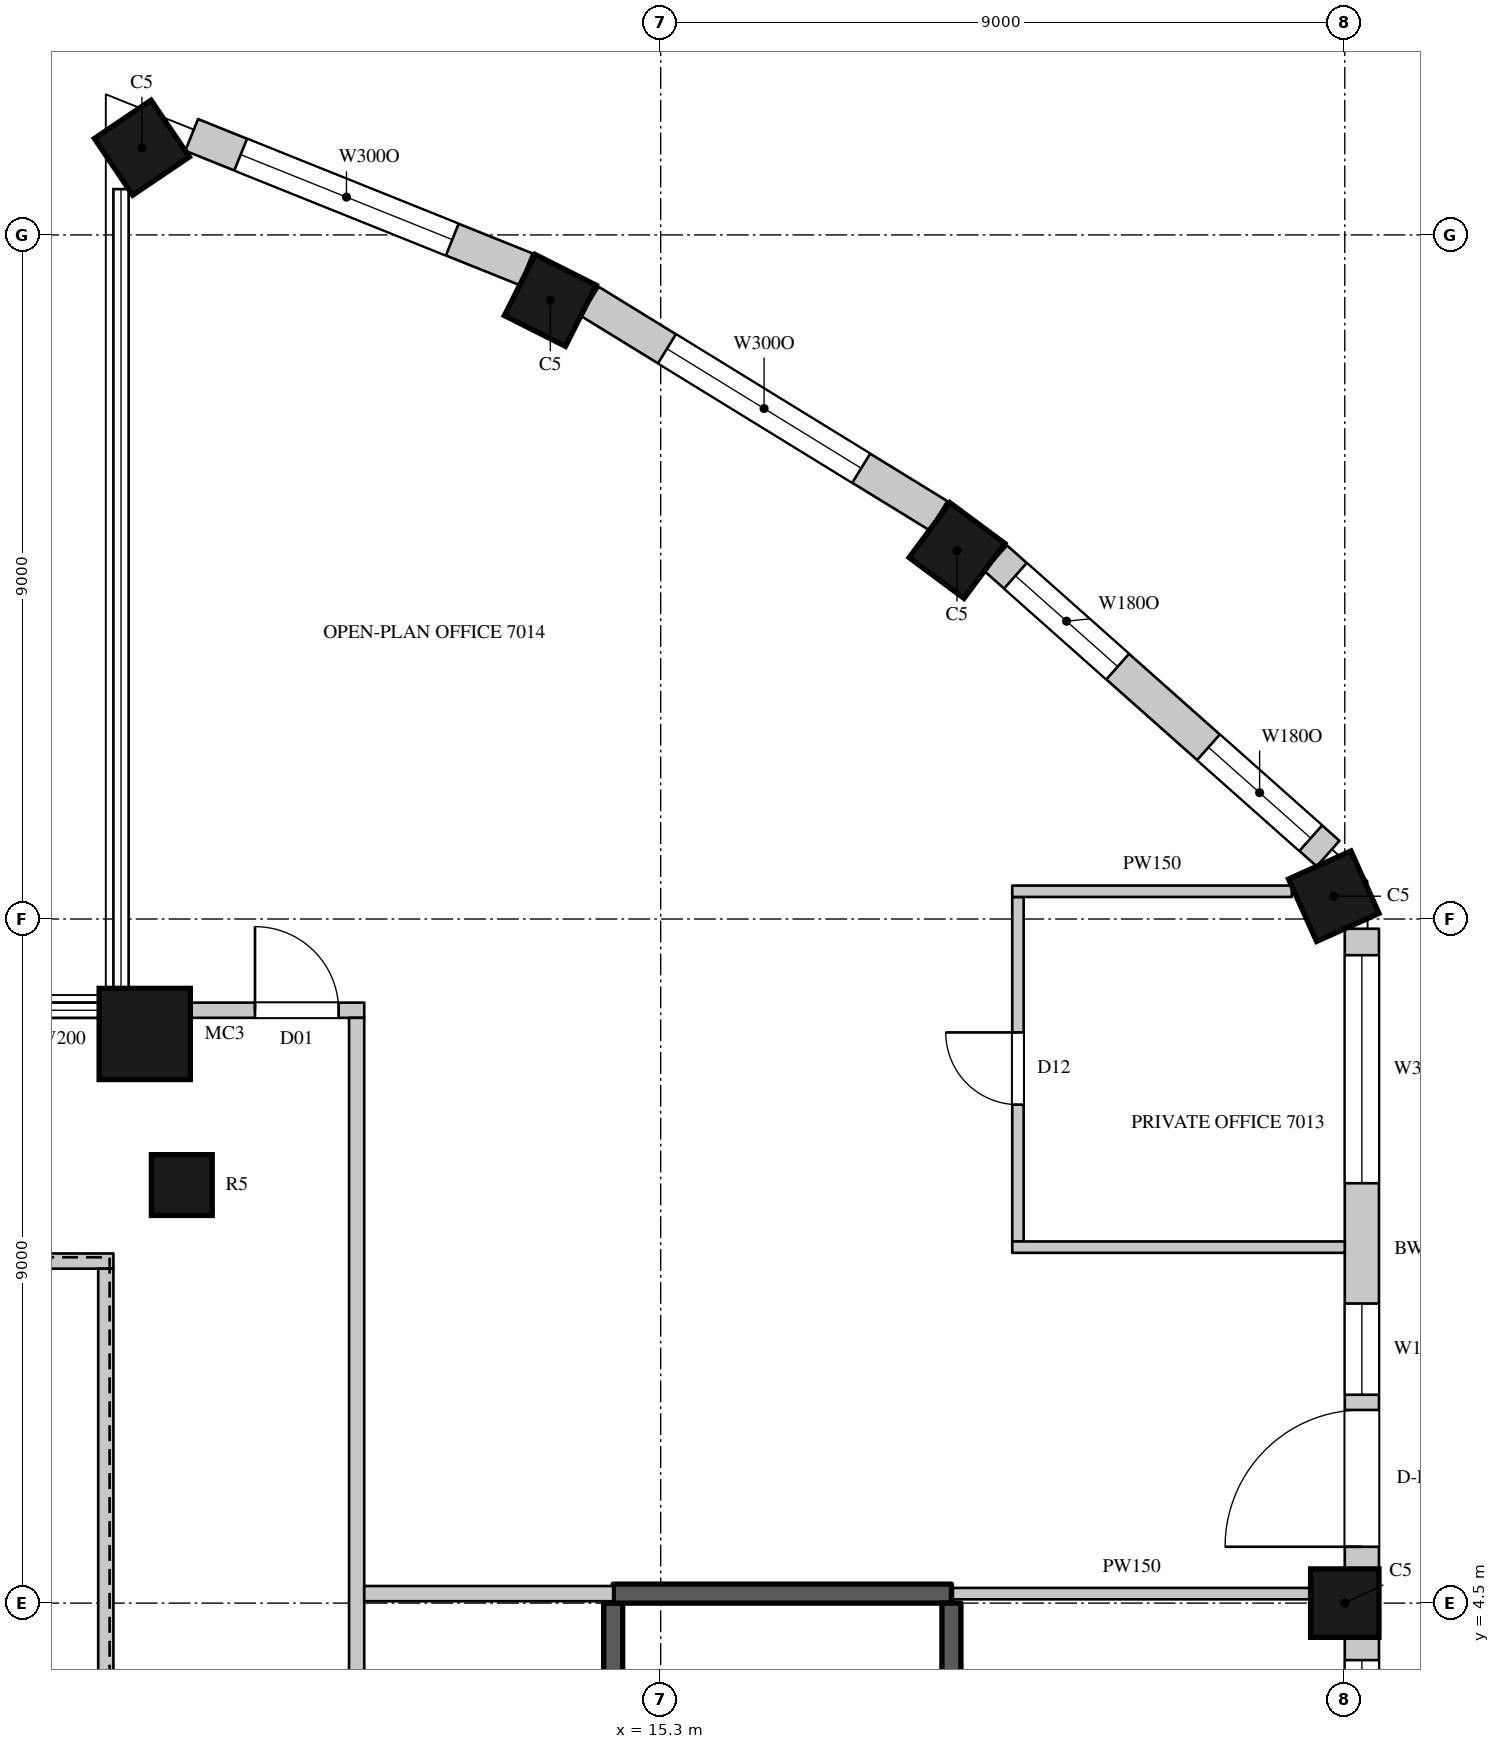
"""IFC4 building model, lengths in metres.
Left out: names, types, materials, properties, quantities, classifications, styles, units other than length and angle.
Written with IfcOpenShell. Run it as: python <this file> out.ifc"""

import sys

from ifc_helpers import new_model, si_unit, direction, frame, frame_2d, origin, origin_2d, place, context, subcontext, project, spatial, rectangle, circle, extrude, element, fill, save


model = new_model("IFC4")
c1 = context("Model", 3, precision=1e-05, world=origin(), true_north=direction((0.0, 1.0)))
c2 = subcontext(c1, "Body", "Model", "MODEL_VIEW")
j1 = project(units=[si_unit("LENGTHUNIT", "METRE"), si_unit("PLANEANGLEUNIT", "RADIAN")], contexts=[c1])
p1 = place(None, origin())
s1 = spatial("IfcSite", under=j1, at=p1, CompositionType="ELEMENT")
p2 = place(p1, origin())
s2 = spatial("IfcBuilding", under=s1, at=p2, CompositionType="ELEMENT")
p3 = place(p2, frame((0.0, 0.0, 309.0)))
s3 = spatial("IfcBuildingStorey", under=s2, at=p3, CompositionType="ELEMENT", Elevation=309.0)
p4 = place(p3, frame((8.475, 23.647, 0.0), z_axis=(0.0, 0.0, 1.0), x_axis=(-0.828469606019, -0.560034027451, 0.0)))
e1 = element("IfcColumn", 1, at=p4, inside=s3, PredefinedType="COLUMN", context=c2, shape_type="SweptSolid", body=[
    extrude(rectangle(XDim=0.9, YDim=0.9, at=origin_2d()), origin(), (0.0, 0.0, 1.0), 4.1),
])
p5 = place(p3, frame((8.512, 11.988, 0.0), z_axis=(0.0, 0.0, 1.0), x_axis=(1.0, 0.0, 0.0)))
e2 = element("IfcColumn", 2, at=p5, inside=s3, PredefinedType="COLUMN", context=c2, shape_type="SweptSolid", body=[
    extrude(circle(Radius=0.6, at=origin_2d()), origin(), (0.0, 0.0, 1.0), 4.1),
])
for number, where, z_axis, x_axis in (
    (3, (24.3, 4.5, 0.0), (0.0, 0.0, 1.0), (0.0, 1.0, 0.0)),
    (4, (24.155, 13.8, 0.0), (0.0, 0.0, 1.0), (-0.41, 0.912, 0.0)),
    (5, (19.198, 18.348, 0.0), (0.0, 0.0, 1.0), (-0.803, 0.596, 0.0)),
    (6, (13.848, 21.638, 0.0), (0.0, 0.0, 1.0), (-0.893, 0.45, 0.0)),
):
    element("IfcColumn", number, at=place(p3, frame(where, z_axis=z_axis, x_axis=x_axis)), inside=s3, PredefinedType="COLUMN", context=c2, shape_type="SweptSolid", body=[
        extrude(rectangle(XDim=0.9, YDim=0.9, at=origin_2d()), origin(), (0.0, 0.0, 1.0), 4.1),
    ])
p6 = place(p3, frame((9.0, 10.0, 0.0), z_axis=(0.0, 0.0, 1.0), x_axis=(1.0, 0.0, 0.0)))
e7 = element("IfcColumn", 7, at=p6, inside=s3, PredefinedType="COLUMN", context=c2, shape_type="SweptSolid", body=[
    extrude(circle(Radius=0.4, at=origin_2d()), origin(), (0.0, 0.0, 1.0), 4.1),
])
p7 = place(p3, frame((24.525, -4.05, 0.0), z_axis=(0.0, 0.0, 1.0), x_axis=(0.0, 1.0, 0.0)))
e8 = element("IfcWall", 8, at=p7, inside=s3, PredefinedType="SOLIDWALL", context=c2, shape_type="SweptSolid", body=[
    extrude(rectangle(XDim=8.1, YDim=0.45, at=frame_2d((4.05, 0.0))), origin(), (0.0, 0.0, 1.0), 3.8),
])
p8 = place(p7, frame((0.3, 0.0, 1.05)))
e9 = element("IfcOpeningElement", 9, at=p8, cuts=e8, PredefinedType="OPENING", context=c2, shape_type="SweptSolid", body=[
    extrude(rectangle(XDim=3.0, YDim=2.4, at=frame_2d((1.5, 1.2))), frame((0.0, 0.235, 0.0), z_axis=(0.0, -1.0, 0.0), x_axis=(1.0, 0.0, 0.0)), (0.0, 0.0, 1.0), 0.47),
])
p9 = place(p7, frame((4.8, 0.0, 1.05)))
e10 = element("IfcOpeningElement", 10, at=p9, cuts=e8, PredefinedType="OPENING", context=c2, shape_type="SweptSolid", body=[
    extrude(rectangle(XDim=3.0, YDim=2.4, at=frame_2d((1.5, 1.2))), frame((0.0, 0.235, 0.0), z_axis=(0.0, -1.0, 0.0), x_axis=(1.0, 0.0, 0.0)), (0.0, 0.0, 1.0), 0.47),
])
p10 = place(p3, frame((24.525, 4.95, 0.0), z_axis=(0.0, 0.0, 1.0), x_axis=(0.0, 1.0, 0.0)))
e11 = element("IfcWall", 11, at=p10, inside=s3, PredefinedType="SOLIDWALL", context=c2, shape_type="SweptSolid", body=[
    extrude(rectangle(XDim=8.422, YDim=0.45, at=frame_2d((4.211, 0.0))), origin(), (0.0, 0.0, 1.0), 3.8),
])
p11 = place(p10, frame((0.291, 0.0, 0.0)))
e12 = element("IfcOpeningElement", 12, at=p11, cuts=e11, PredefinedType="OPENING", context=c2, shape_type="SweptSolid", body=[
    extrude(rectangle(XDim=1.8, YDim=2.4, at=frame_2d((0.9, 1.2))), frame((0.0, 0.235, 0.0), z_axis=(0.0, -1.0, 0.0), x_axis=(1.0, 0.0, 0.0)), (0.0, 0.0, 1.0), 0.47),
])
p12 = place(p10, frame((2.291, 0.0, 1.05)))
e13 = element("IfcOpeningElement", 13, at=p12, cuts=e11, PredefinedType="OPENING", context=c2, shape_type="SweptSolid", body=[
    extrude(rectangle(XDim=1.2, YDim=2.4, at=frame_2d((0.6, 1.2))), frame((0.0, 0.235, 0.0), z_axis=(0.0, -1.0, 0.0), x_axis=(1.0, 0.0, 0.0)), (0.0, 0.0, 1.0), 0.47),
])
p13 = place(p10, frame((5.074, 0.0, 1.05)))
e14 = element("IfcOpeningElement", 14, at=p13, cuts=e11, PredefinedType="OPENING", context=c2, shape_type="SweptSolid", body=[
    extrude(rectangle(XDim=3.0, YDim=2.4, at=frame_2d((1.5, 1.2))), frame((0.0, 0.235, 0.0), z_axis=(0.0, -1.0, 0.0), x_axis=(1.0, 0.0, 0.0)), (0.0, 0.0, 1.0), 0.47),
])
p14 = place(p3, frame((24.081, 14.361, 0.0), z_axis=(0.0, 0.0, 1.0), x_axis=(-0.747570482973, 0.664182484704, 0.0)))
e15 = element("IfcWall", 15, at=p14, inside=s3, PredefinedType="SOLIDWALL", context=c2, shape_type="SweptSolid", body=[
    extrude(rectangle(XDim=5.85, YDim=0.45, at=frame_2d((2.925, 0.0))), origin(), (0.0, 0.0, 1.0), 3.8),
])
p15 = place(p14, frame((0.305, 0.0, 1.05)))
e16 = element("IfcOpeningElement", 16, at=p15, cuts=e15, PredefinedType="OPENING", context=c2, shape_type="SweptSolid", body=[
    extrude(rectangle(XDim=1.8, YDim=2.4, at=frame_2d((0.9, 1.2))), frame((0.0, 0.235, 0.0), z_axis=(0.0, -1.0, 0.0), x_axis=(1.0, 0.0, 0.0)), (0.0, 0.0, 1.0), 0.47),
])
p16 = place(p14, frame((3.703, 0.0, 1.05)))
e17 = element("IfcOpeningElement", 17, at=p16, cuts=e15, PredefinedType="OPENING", context=c2, shape_type="SweptSolid", body=[
    extrude(rectangle(XDim=1.8, YDim=2.4, at=frame_2d((0.9, 1.2))), frame((0.0, 0.235, 0.0), z_axis=(0.0, -1.0, 0.0), x_axis=(1.0, 0.0, 0.0)), (0.0, 0.0, 1.0), 0.47),
])
p17 = place(p3, frame((18.953, 18.806, 0.0), z_axis=(0.0, 0.0, 1.0), x_axis=(-0.851860664503, 0.523768468193, 0.0)))
e18 = element("IfcWall", 18, at=p17, inside=s3, PredefinedType="SOLIDWALL", context=c2, shape_type="SweptSolid", body=[
    extrude(rectangle(XDim=5.384, YDim=0.45, at=frame_2d((2.692, 0.0))), origin(), (0.0, 0.0, 1.0), 3.8),
])
p18 = place(p17, frame((1.192, 0.0, 1.05)))
e19 = element("IfcOpeningElement", 19, at=p18, cuts=e18, PredefinedType="OPENING", context=c2, shape_type="SweptSolid", body=[
    extrude(rectangle(XDim=3.0, YDim=2.4, at=frame_2d((1.5, 1.2))), frame((0.0, 0.235, 0.0), z_axis=(0.0, -1.0, 0.0), x_axis=(1.0, 0.0, 0.0)), (0.0, 0.0, 1.0), 0.47),
])
p19 = place(p3, frame((13.529, 22.048, 0.0), z_axis=(0.0, 0.0, 1.0), x_axis=(-0.927957332619, 0.372686448424, 0.0)))
e20 = element("IfcWall", 20, at=p19, inside=s3, PredefinedType="SOLIDWALL", context=c2, shape_type="SweptSolid", body=[
    extrude(rectangle(XDim=4.741, YDim=0.45, at=frame_2d((2.371, 0.0))), origin(), (0.0, 0.0, 1.0), 3.8),
])
p20 = place(p19, frame((1.047, 0.0, 1.05)))
e21 = element("IfcOpeningElement", 21, at=p20, cuts=e20, PredefinedType="OPENING", context=c2, shape_type="SweptSolid", body=[
    extrude(rectangle(XDim=3.0, YDim=2.4, at=frame_2d((1.5, 1.2))), frame((0.0, 0.235, 0.0), z_axis=(0.0, -1.0, 0.0), x_axis=(1.0, 0.0, 0.0)), (0.0, 0.0, 1.0), 0.47),
])
p21 = place(p3, frame((4.52, 9.0, 0.0), z_axis=(0.0, 0.0, 1.0), x_axis=(1.0, 0.0, 0.0)))
e22 = element("IfcWall", 22, at=p21, inside=s3, PredefinedType="PARTITIONING", context=c2, shape_type="SweptSolid", body=[
    extrude(rectangle(XDim=3.58, YDim=0.2, at=frame_2d((1.79, 0.0))), origin(), (0.0, 0.0, 1.0), 3.8),
])
p22 = place(p3, frame((6.75, 12.3, 0.0), z_axis=(0.0, 0.0, 1.0), x_axis=(1.0, 0.0, 0.0)))
e23 = element("IfcWall", 23, at=p22, inside=s3, PredefinedType="PARTITIONING", context=c2, shape_type="SweptSolid", body=[
    extrude(rectangle(XDim=1.212, YDim=0.2, at=frame_2d((0.606, 0.0))), origin(), (0.0, 0.0, 1.0), 3.8),
])
p23 = place(p3, frame((8.0, -8.9, 0.0), z_axis=(0.0, 0.0, 1.0), x_axis=(0.0, 1.0, 0.0)))
e24 = element("IfcWall", 24, at=p23, inside=s3, PredefinedType="PARTITIONING", context=c2, shape_type="SweptSolid", body=[
    extrude(rectangle(XDim=17.8, YDim=0.2, at=frame_2d((8.9, 0.0))), origin(), (0.0, 0.0, 1.0), 3.8),
])
p24 = place(p3, frame((9.062, 12.3, 0.0), z_axis=(0.0, 0.0, 1.0), x_axis=(1.0, 0.0, 0.0)))
e25 = element("IfcWall", 25, at=p24, inside=s3, PredefinedType="PARTITIONING", context=c2, shape_type="SweptSolid", body=[
    extrude(rectangle(XDim=2.338, YDim=0.2, at=frame_2d((1.169, 0.0))), origin(), (0.0, 0.0, 1.0), 3.8),
])
p25 = place(p24, frame((0.9, 0.0, 0.0)))
e26 = element("IfcOpeningElement", 26, at=p25, cuts=e25, PredefinedType="OPENING", context=c2, shape_type="SweptSolid", body=[
    extrude(rectangle(XDim=1.1, YDim=2.4, at=frame_2d((0.55, 1.2))), frame((0.0, 0.11, 0.0), z_axis=(0.0, -1.0, 0.0), x_axis=(1.0, 0.0, 0.0)), (0.0, 0.0, 1.0), 0.22),
])
p26 = place(p3, frame((11.3, -12.3, 0.0), z_axis=(0.0, 0.0, 1.0), x_axis=(0.0, 1.0, 0.0)))
e27 = element("IfcWall", 27, at=p26, inside=s3, PredefinedType="PARTITIONING", context=c2, shape_type="SweptSolid", body=[
    extrude(rectangle(XDim=24.5, YDim=0.2, at=frame_2d((12.25, 0.0))), origin(), (0.0, 0.0, 1.0), 3.8),
])
p27 = place(p26, frame((10.15, 0.0, 0.0)))
e28 = element("IfcOpeningElement", 28, at=p27, cuts=e27, PredefinedType="OPENING", context=c2, shape_type="SweptSolid", body=[
    extrude(rectangle(XDim=1.5, YDim=2.4, at=frame_2d((0.75, 1.2))), frame((0.0, 0.11, 0.0), z_axis=(0.0, -1.0, 0.0), x_axis=(1.0, 0.0, 0.0)), (0.0, 0.0, 1.0), 0.22),
])
p28 = place(p3, frame((11.4, 4.625, 0.0), z_axis=(0.0, 0.0, 1.0), x_axis=(1.0, 0.0, 0.0)))
e29 = element("IfcWall", 29, at=p28, inside=s3, PredefinedType="PARTITIONING", context=c2, shape_type="SweptSolid", body=[
    extrude(rectangle(XDim=3.275, YDim=0.2, at=frame_2d((1.638, 0.0))), origin(), (0.0, 0.0, 1.0), 3.8),
])
p29 = place(p3, frame((19.145, 4.625, 0.0), z_axis=(0.0, 0.0, 1.0), x_axis=(1.0, 0.0, 0.0)))
e30 = element("IfcWall", 30, at=p29, inside=s3, PredefinedType="PARTITIONING", context=c2, shape_type="SweptSolid", body=[
    extrude(rectangle(XDim=4.705, YDim=0.15, at=frame_2d((2.353, 0.0))), origin(), (0.0, 0.0, 1.0), 3.8),
])
p30 = place(p3, frame((20.0, 9.258, 0.0), z_axis=(0.0, 0.0, 1.0), x_axis=(0.0, 1.0, 0.0)))
e31 = element("IfcWall", 31, at=p30, inside=s3, PredefinedType="PARTITIONING", context=c2, shape_type="SweptSolid", body=[
    extrude(rectangle(XDim=4.532, YDim=0.15, at=frame_2d((2.266, 0.0))), origin(), (0.0, 0.0, 1.0), 3.8),
])
p31 = place(p30, frame((1.8, 0.0, 0.0)))
e32 = element("IfcOpeningElement", 32, at=p31, cuts=e31, PredefinedType="OPENING", context=c2, shape_type="SweptSolid", body=[
    extrude(rectangle(XDim=0.95, YDim=2.2, at=frame_2d((0.475, 1.1))), frame((0.0, 0.085, 0.0), z_axis=(0.0, -1.0, 0.0), x_axis=(1.0, 0.0, 0.0)), (0.0, 0.0, 1.0), 0.17),
])
p32 = place(p3, frame((19.925, 9.183, 0.0), z_axis=(0.0, 0.0, 1.0), x_axis=(1.0, 0.0, 0.0)))
e33 = element("IfcWall", 33, at=p32, inside=s3, PredefinedType="PARTITIONING", context=c2, shape_type="SweptSolid", body=[
    extrude(rectangle(XDim=4.375, YDim=0.15, at=frame_2d((2.188, 0.0))), origin(), (0.0, 0.0, 1.0), 3.15),
])
p33 = place(p3, frame((19.925, 13.865, 0.0), z_axis=(0.0, 0.0, 1.0), x_axis=(1.0, 0.0, 0.0)))
e34 = element("IfcWall", 34, at=p33, inside=s3, PredefinedType="PARTITIONING", context=c2, shape_type="SweptSolid", body=[
    extrude(rectangle(XDim=3.678, YDim=0.15, at=frame_2d((1.839, 0.0))), origin(), (0.0, 0.0, 1.0), 3.8),
])
p34 = place(p3, frame((14.675, -4.5, 0.0), z_axis=(0.0, 0.0, 1.0), x_axis=(0.0, 1.0, 0.0)))
e35 = element("IfcWall", 35, at=p34, inside=s3, PredefinedType="SHEAR", context=c2, shape_type="SweptSolid", body=[
    extrude(rectangle(XDim=9.0, YDim=0.25, at=frame_2d((4.5, 0.0))), origin(), (0.0, 0.0, 1.0), 3.8),
])
p35 = place(p34, frame((0.45, 0.0, 0.0)))
e36 = element("IfcOpeningElement", 36, at=p35, cuts=e35, PredefinedType="OPENING", context=c2, shape_type="SweptSolid", body=[
    extrude(rectangle(XDim=1.1, YDim=2.2, at=frame_2d((0.55, 1.1))), frame((0.0, 0.135, 0.0), z_axis=(0.0, -1.0, 0.0), x_axis=(1.0, 0.0, 0.0)), (0.0, 0.0, 1.0), 0.27),
])
p36 = place(p3, frame((14.675, 4.625, 0.0), z_axis=(0.0, 0.0, 1.0), x_axis=(1.0, 0.0, 0.0)))
e37 = element("IfcWall", 37, at=p36, inside=s3, PredefinedType="SHEAR", context=c2, shape_type="SweptSolid", body=[
    extrude(rectangle(XDim=4.45, YDim=0.25, at=frame_2d((2.225, 0.0))), origin(), (0.0, 0.0, 1.0), 3.8),
])
p37 = place(p3, frame((19.125, -4.5, 0.0), z_axis=(0.0, 0.0, 1.0), x_axis=(0.0, 1.0, 0.0)))
e38 = element("IfcWall", 38, at=p37, inside=s3, PredefinedType="SHEAR", context=c2, shape_type="SweptSolid", body=[
    extrude(rectangle(XDim=9.0, YDim=0.25, at=frame_2d((4.5, 0.0))), origin(), (0.0, 0.0, 1.0), 3.8),
])
p38 = place(p9, origin())
e39 = element("IfcWindow", 39, at=p38, inside=s3, PartitioningType="SINGLE_PANEL", PredefinedType="WINDOW", context=c2, shape_type="SweptSolid", body=[
    extrude(rectangle(XDim=3.0, YDim=2.4, at=frame_2d((1.5, 1.2))), frame((0.0, 0.135, 0.0), z_axis=(0.0, -1.0, 0.0), x_axis=(1.0, 0.0, 0.0)), (0.0, 0.0, 1.0), 0.06),
])
fill(e10, e39)
p39 = place(p11, origin())
e40 = element("IfcDoor", 40, at=p39, inside=s3, OperationType="SLIDING_TO_LEFT", PredefinedType="DOOR", context=c2, shape_type="SweptSolid", body=[
    extrude(rectangle(XDim=1.8, YDim=2.4, at=frame_2d((0.9, 1.2))), frame((0.0, 0.13, 0.0), z_axis=(0.0, -1.0, 0.0), x_axis=(1.0, 0.0, 0.0)), (0.0, 0.0, 1.0), 0.05),
])
fill(e12, e40)
p40 = place(p12, origin())
e41 = element("IfcWindow", 41, at=p40, inside=s3, PartitioningType="SINGLE_PANEL", PredefinedType="WINDOW", context=c2, shape_type="SweptSolid", body=[
    extrude(rectangle(XDim=1.2, YDim=2.4, at=frame_2d((0.6, 1.2))), frame((0.0, 0.135, 0.0), z_axis=(0.0, -1.0, 0.0), x_axis=(1.0, 0.0, 0.0)), (0.0, 0.0, 1.0), 0.06),
])
fill(e13, e41)
p41 = place(p13, origin())
e42 = element("IfcWindow", 42, at=p41, inside=s3, PartitioningType="SINGLE_PANEL", PredefinedType="WINDOW", context=c2, shape_type="SweptSolid", body=[
    extrude(rectangle(XDim=3.0, YDim=2.4, at=frame_2d((1.5, 1.2))), frame((0.0, 0.135, 0.0), z_axis=(0.0, -1.0, 0.0), x_axis=(1.0, 0.0, 0.0)), (0.0, 0.0, 1.0), 0.06),
])
fill(e14, e42)
p42 = place(p15, origin())
e43 = element("IfcWindow", 43, at=p42, inside=s3, PartitioningType="SINGLE_PANEL", PredefinedType="WINDOW", context=c2, shape_type="SweptSolid", body=[
    extrude(rectangle(XDim=1.8, YDim=2.4, at=frame_2d((0.9, 1.2))), frame((0.0, 0.135, 0.0), z_axis=(0.0, -1.0, 0.0), x_axis=(1.0, 0.0, 0.0)), (0.0, 0.0, 1.0), 0.06),
])
fill(e16, e43)
p43 = place(p16, origin())
e44 = element("IfcWindow", 44, at=p43, inside=s3, PartitioningType="SINGLE_PANEL", PredefinedType="WINDOW", context=c2, shape_type="SweptSolid", body=[
    extrude(rectangle(XDim=1.8, YDim=2.4, at=frame_2d((0.9, 1.2))), frame((0.0, 0.135, 0.0), z_axis=(0.0, -1.0, 0.0), x_axis=(1.0, 0.0, 0.0)), (0.0, 0.0, 1.0), 0.06),
])
fill(e17, e44)
p44 = place(p18, origin())
e45 = element("IfcWindow", 45, at=p44, inside=s3, PartitioningType="SINGLE_PANEL", PredefinedType="WINDOW", context=c2, shape_type="SweptSolid", body=[
    extrude(rectangle(XDim=3.0, YDim=2.4, at=frame_2d((1.5, 1.2))), frame((0.0, 0.135, 0.0), z_axis=(0.0, -1.0, 0.0), x_axis=(1.0, 0.0, 0.0)), (0.0, 0.0, 1.0), 0.06),
])
fill(e19, e45)
p45 = place(p20, origin())
e46 = element("IfcWindow", 46, at=p45, inside=s3, PartitioningType="SINGLE_PANEL", PredefinedType="WINDOW", context=c2, shape_type="SweptSolid", body=[
    extrude(rectangle(XDim=3.0, YDim=2.4, at=frame_2d((1.5, 1.2))), frame((0.0, 0.135, 0.0), z_axis=(0.0, -1.0, 0.0), x_axis=(1.0, 0.0, 0.0)), (0.0, 0.0, 1.0), 0.06),
])
fill(e21, e46)
p46 = place(p25, origin())
e47 = element("IfcDoor", 47, at=p46, inside=s3, OperationType="SINGLE_SWING_LEFT", PredefinedType="DOOR", context=c2, shape_type="SweptSolid", body=[
    extrude(rectangle(XDim=1.1, YDim=2.4, at=frame_2d((0.55, 1.2))), frame((0.0, 0.025, 0.0), z_axis=(0.0, -1.0, 0.0), x_axis=(1.0, 0.0, 0.0)), (0.0, 0.0, 1.0), 0.05),
])
fill(e26, e47)
p47 = place(p31, origin())
e48 = element("IfcDoor", 48, at=p47, inside=s3, OperationType="SINGLE_SWING_RIGHT", PredefinedType="DOOR", context=c2, shape_type="SweptSolid", body=[
    extrude(rectangle(XDim=0.95, YDim=2.2, at=frame_2d((0.475, 1.1))), frame((0.0, 0.025, 0.0), z_axis=(0.0, -1.0, 0.0), x_axis=(1.0, 0.0, 0.0)), (0.0, 0.0, 1.0), 0.05),
])
fill(e32, e48)
save(model, sys.argv[1])
